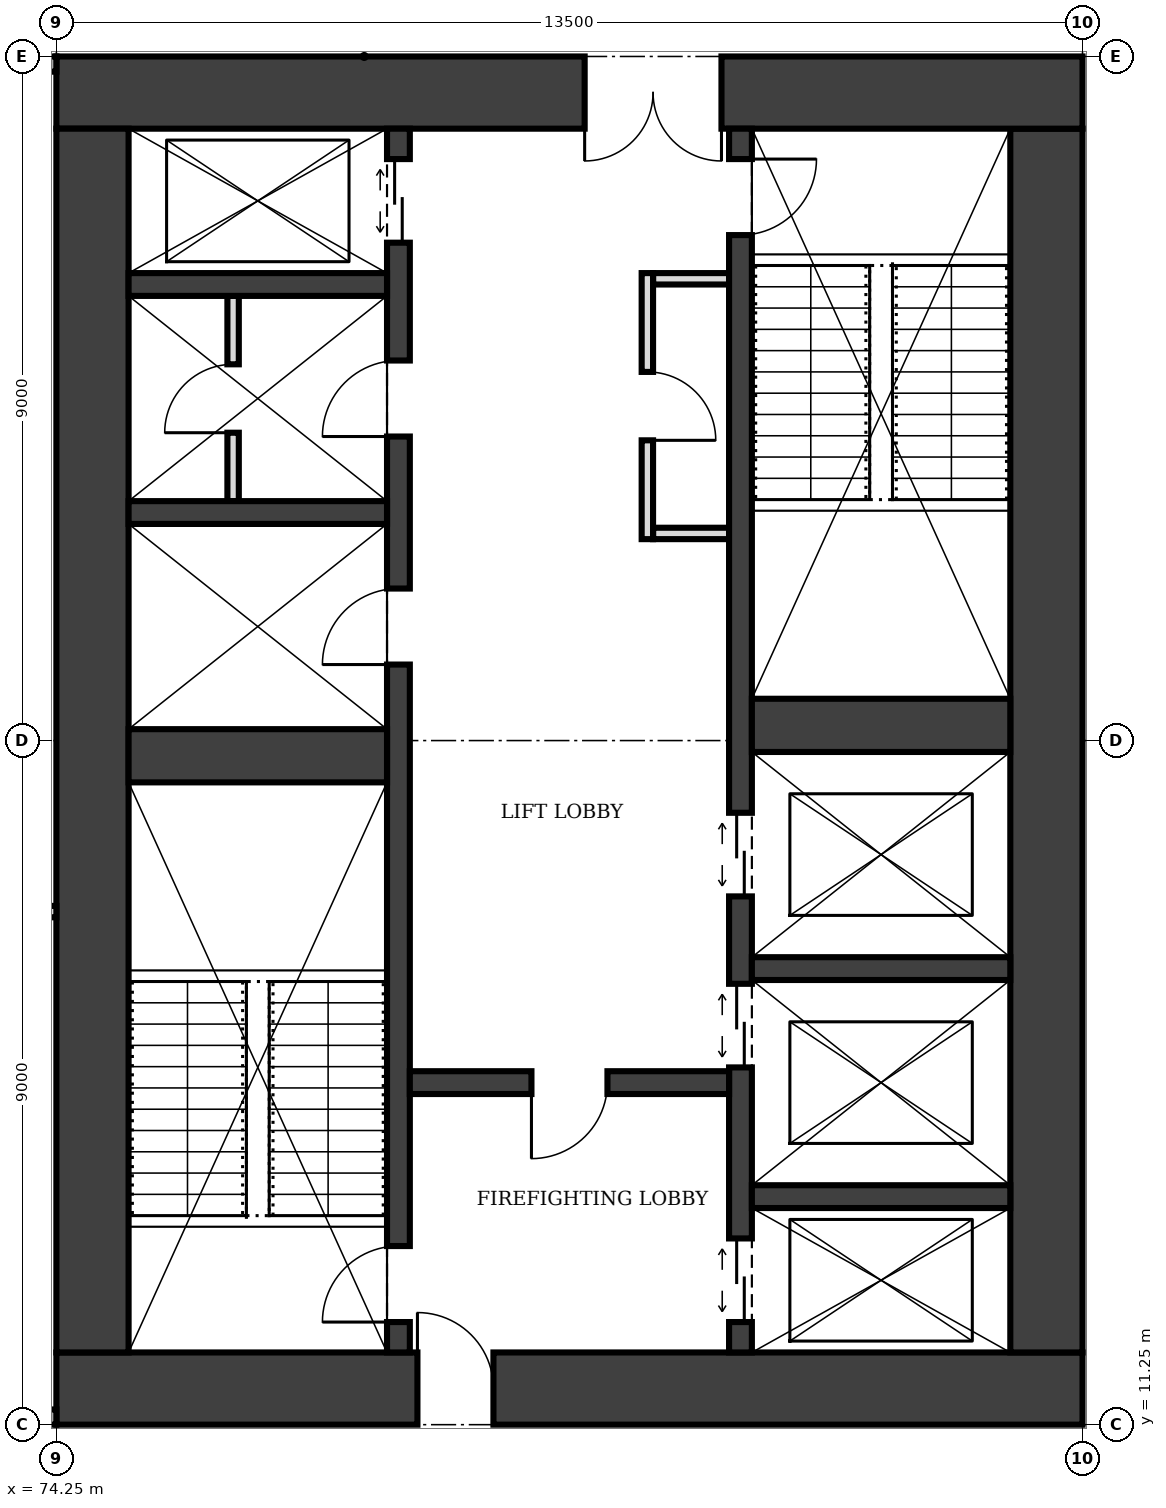
"""IFC4 building model, lengths in metres.
Left out: names, types, materials, properties, quantities, classifications, styles, units other than length and angle.
Written with IfcOpenShell. Run it as: python <this file> out.ifc"""

import sys

from ifc_helpers import new_model, si_unit, direction, frame, frame_2d, origin, place, context, subcontext, project, spatial, rectangle, extrude, element, fill, save


model = new_model("IFC4")
c1 = context("Model", 3, precision=1e-05, world=origin(), true_north=direction((0.0, 1.0)))
c2 = subcontext(c1, "Body", "Model", "MODEL_VIEW")
j1 = project(units=[si_unit("LENGTHUNIT", "METRE"), si_unit("PLANEANGLEUNIT", "RADIAN")], contexts=[c1])
p1 = place(None, origin())
s1 = spatial("IfcSite", under=j1, at=p1, CompositionType="ELEMENT")
p2 = place(p1, origin())
s2 = spatial("IfcBuilding", under=s1, at=p2, CompositionType="ELEMENT")
p3 = place(p2, frame((0.0, 0.0, 161.0)))
s3 = spatial("IfcBuildingStorey", under=s2, at=p3, CompositionType="ELEMENT", Elevation=161.0)
p4 = place(p3, frame((74.25, 11.725, 0.0), z_axis=(0.0, 0.0, 1.0), x_axis=(1.0, 0.0, 0.0)))
e1 = element("IfcWall", 1, at=p4, inside=s3, PredefinedType="SHEAR", context=c2, shape_type="SweptSolid", body=[
    extrude(rectangle(XDim=13.5, YDim=0.95, at=frame_2d((6.75, 0.0))), origin(), (0.0, 0.0, 1.0), 4.0),
])
p5 = place(p4, frame((4.75, 0.0, 0.0)))
e2 = element("IfcOpeningElement", 2, at=p5, cuts=e1, PredefinedType="OPENING", context=c2, shape_type="SweptSolid", body=[
    extrude(rectangle(XDim=1.0, YDim=2.1, at=frame_2d((0.5, 1.05))), frame((0.0, 0.485, 0.0), z_axis=(0.0, -1.0, 0.0), x_axis=(1.0, 0.0, 0.0)), (0.0, 0.0, 1.0), 0.97),
])
p6 = place(p3, frame((87.275, 12.2, 0.0), z_axis=(0.0, 0.0, 1.0), x_axis=(0.0, 1.0, 0.0)))
e3 = element("IfcWall", 3, at=p6, inside=s3, PredefinedType="SHEAR", context=c2, shape_type="SweptSolid", body=[
    extrude(rectangle(XDim=16.1, YDim=0.95, at=frame_2d((8.05, 0.0))), origin(), (0.0, 0.0, 1.0), 4.0),
])
p7 = place(p3, frame((87.75, 28.775, 0.0), z_axis=(0.0, 0.0, 1.0), x_axis=(-1.0, 0.0, 0.0)))
e4 = element("IfcWall", 4, at=p7, inside=s3, PredefinedType="SHEAR", context=c2, shape_type="SweptSolid", body=[
    extrude(rectangle(XDim=13.5, YDim=0.95, at=frame_2d((6.75, 0.0))), origin(), (0.0, 0.0, 1.0), 4.0),
])
p8 = place(p7, frame((4.75, 0.0, 0.0)))
e5 = element("IfcOpeningElement", 5, at=p8, cuts=e4, PredefinedType="OPENING", context=c2, shape_type="SweptSolid", body=[
    extrude(rectangle(XDim=1.8, YDim=2.1, at=frame_2d((0.9, 1.05))), frame((0.0, 0.485, 0.0), z_axis=(0.0, -1.0, 0.0), x_axis=(1.0, 0.0, 0.0)), (0.0, 0.0, 1.0), 0.97),
])
p9 = place(p3, frame((74.725, 28.3, 0.0), z_axis=(0.0, 0.0, 1.0), x_axis=(0.0, -1.0, 0.0)))
e6 = element("IfcWall", 6, at=p9, inside=s3, PredefinedType="SHEAR", context=c2, shape_type="SweptSolid", body=[
    extrude(rectangle(XDim=16.1, YDim=0.95, at=frame_2d((8.05, 0.0))), origin(), (0.0, 0.0, 1.0), 4.0),
])
p10 = place(p3, frame((78.75, 12.2, 0.0), z_axis=(0.0, 0.0, 1.0), x_axis=(0.0, 1.0, 0.0)))
e7 = element("IfcWall", 7, at=p10, inside=s3, PredefinedType="SHEAR", context=c2, shape_type="SweptSolid", body=[
    extrude(rectangle(XDim=16.1, YDim=0.3, at=frame_2d((8.05, 0.0))), origin(), (0.0, 0.0, 1.0), 4.0),
])
p11 = place(p10, frame((0.4, 0.0, 0.0)))
e8 = element("IfcOpeningElement", 8, at=p11, cuts=e7, PredefinedType="OPENING", context=c2, shape_type="SweptSolid", body=[
    extrude(rectangle(XDim=1.0, YDim=2.1, at=frame_2d((0.5, 1.05))), frame((0.0, 0.16, 0.0), z_axis=(0.0, -1.0, 0.0), x_axis=(1.0, 0.0, 0.0)), (0.0, 0.0, 1.0), 0.32),
])
p12 = place(p10, frame((14.6, 0.0, 0.0)))
e9 = element("IfcOpeningElement", 9, at=p12, cuts=e7, PredefinedType="OPENING", context=c2, shape_type="SweptSolid", body=[
    extrude(rectangle(XDim=1.1, YDim=2.1, at=frame_2d((0.55, 1.05))), frame((0.0, 0.16, 0.0), z_axis=(0.0, -1.0, 0.0), x_axis=(1.0, 0.0, 0.0)), (0.0, 0.0, 1.0), 0.32),
])
p13 = place(p10, frame((9.05, 0.0, 0.0)))
e10 = element("IfcOpeningElement", 10, at=p13, cuts=e7, PredefinedType="OPENING", context=c2, shape_type="SweptSolid", body=[
    extrude(rectangle(XDim=1.0, YDim=2.1, at=frame_2d((0.5, 1.05))), frame((0.0, 0.16, 0.0), z_axis=(0.0, -1.0, 0.0), x_axis=(1.0, 0.0, 0.0)), (0.0, 0.0, 1.0), 0.32),
])
p14 = place(p10, frame((12.05, 0.0, 0.0)))
e11 = element("IfcOpeningElement", 11, at=p14, cuts=e7, PredefinedType="OPENING", context=c2, shape_type="SweptSolid", body=[
    extrude(rectangle(XDim=1.0, YDim=2.1, at=frame_2d((0.5, 1.05))), frame((0.0, 0.16, 0.0), z_axis=(0.0, -1.0, 0.0), x_axis=(1.0, 0.0, 0.0)), (0.0, 0.0, 1.0), 0.32),
])
p15 = place(p3, frame((83.25, 12.2, 0.0), z_axis=(0.0, 0.0, 1.0), x_axis=(0.0, 1.0, 0.0)))
e12 = element("IfcWall", 12, at=p15, inside=s3, PredefinedType="SHEAR", context=c2, shape_type="SweptSolid", body=[
    extrude(rectangle(XDim=16.1, YDim=0.3, at=frame_2d((8.05, 0.0))), origin(), (0.0, 0.0, 1.0), 4.0),
])
p16 = place(p15, frame((14.7, 0.0, 0.0)))
e13 = element("IfcOpeningElement", 13, at=p16, cuts=e12, PredefinedType="OPENING", context=c2, shape_type="SweptSolid", body=[
    extrude(rectangle(XDim=1.0, YDim=2.1, at=frame_2d((0.5, 1.05))), frame((0.0, 0.16, 0.0), z_axis=(0.0, -1.0, 0.0), x_axis=(1.0, 0.0, 0.0)), (0.0, 0.0, 1.0), 0.32),
])
p17 = place(p15, frame((0.4, 0.0, 0.0)))
e14 = element("IfcOpeningElement", 14, at=p17, cuts=e12, PredefinedType="OPENING", context=c2, shape_type="SweptSolid", body=[
    extrude(rectangle(XDim=1.1, YDim=2.1, at=frame_2d((0.55, 1.05))), frame((0.0, 0.16, 0.0), z_axis=(0.0, -1.0, 0.0), x_axis=(1.0, 0.0, 0.0)), (0.0, 0.0, 1.0), 0.32),
])
p18 = place(p15, frame((3.75, 0.0, 0.0)))
e15 = element("IfcOpeningElement", 15, at=p18, cuts=e12, PredefinedType="OPENING", context=c2, shape_type="SweptSolid", body=[
    extrude(rectangle(XDim=1.1, YDim=2.1, at=frame_2d((0.55, 1.05))), frame((0.0, 0.16, 0.0), z_axis=(0.0, -1.0, 0.0), x_axis=(1.0, 0.0, 0.0)), (0.0, 0.0, 1.0), 0.32),
])
p19 = place(p15, frame((6.0, 0.0, 0.0)))
e16 = element("IfcOpeningElement", 16, at=p19, cuts=e12, PredefinedType="OPENING", context=c2, shape_type="SweptSolid", body=[
    extrude(rectangle(XDim=1.1, YDim=2.1, at=frame_2d((0.55, 1.05))), frame((0.0, 0.16, 0.0), z_axis=(0.0, -1.0, 0.0), x_axis=(1.0, 0.0, 0.0)), (0.0, 0.0, 1.0), 0.32),
])
p20 = place(p3, frame((75.2, 20.05, 0.0), z_axis=(0.0, 0.0, 1.0), x_axis=(1.0, 0.0, 0.0)))
e17 = element("IfcWall", 17, at=p20, inside=s3, PredefinedType="SHEAR", context=c2, shape_type="SweptSolid", body=[
    extrude(rectangle(XDim=3.4, YDim=0.7, at=frame_2d((1.7, 0.0))), origin(), (0.0, 0.0, 1.0), 4.0),
])
p21 = place(p3, frame((78.9, 15.75, 0.0), z_axis=(0.0, 0.0, 1.0), x_axis=(1.0, 0.0, 0.0)))
e18 = element("IfcWall", 18, at=p21, inside=s3, PredefinedType="SHEAR", context=c2, shape_type="SweptSolid", body=[
    extrude(rectangle(XDim=4.2, YDim=0.3, at=frame_2d((2.1, 0.0))), origin(), (0.0, 0.0, 1.0), 4.0),
])
p22 = place(p21, frame((1.6, 0.0, 0.0)))
e19 = element("IfcOpeningElement", 19, at=p22, cuts=e18, PredefinedType="OPENING", context=c2, shape_type="SweptSolid", body=[
    extrude(rectangle(XDim=1.0, YDim=2.1, at=frame_2d((0.5, 1.05))), frame((0.0, 0.16, 0.0), z_axis=(0.0, -1.0, 0.0), x_axis=(1.0, 0.0, 0.0)), (0.0, 0.0, 1.0), 0.32),
])
for number, where, z_axis, x_axis in (
    (20, (83.4, 14.25, 0.0), (0.0, 0.0, 1.0), (1.0, 0.0, 0.0)),
    (21, (83.4, 17.25, 0.0), (0.0, 0.0, 1.0), (1.0, 0.0, 0.0)),
):
    element("IfcWall", number, at=place(p3, frame(where, z_axis=z_axis, x_axis=x_axis)), inside=s3, PredefinedType="SHEAR", context=c2, shape_type="SweptSolid", body=[
        extrude(rectangle(XDim=3.4, YDim=0.3, at=frame_2d((1.7, 0.0))), origin(), (0.0, 0.0, 1.0), 4.0),
    ])
p23 = place(p3, frame((83.4, 20.45, 0.0), z_axis=(0.0, 0.0, 1.0), x_axis=(1.0, 0.0, 0.0)))
e22 = element("IfcWall", 22, at=p23, inside=s3, PredefinedType="SHEAR", context=c2, shape_type="SweptSolid", body=[
    extrude(rectangle(XDim=3.4, YDim=0.7, at=frame_2d((1.7, 0.0))), origin(), (0.0, 0.0, 1.0), 4.0),
])
for number, where, z_axis, x_axis in (
    (23, (75.2, 23.25, 0.0), (0.0, 0.0, 1.0), (1.0, 0.0, 0.0)),
    (24, (75.2, 26.25, 0.0), (0.0, 0.0, 1.0), (1.0, 0.0, 0.0)),
):
    element("IfcWall", number, at=place(p3, frame(where, z_axis=z_axis, x_axis=x_axis)), inside=s3, PredefinedType="SHEAR", context=c2, shape_type="SweptSolid", body=[
        extrude(rectangle(XDim=3.4, YDim=0.3, at=frame_2d((1.7, 0.0))), origin(), (0.0, 0.0, 1.0), 4.0),
    ])
p24 = place(p3, frame((82.025, 22.9, 0.0), z_axis=(0.0, 0.0, 1.0), x_axis=(0.0, 1.0, 0.0)))
e25 = element("IfcWall", 25, at=p24, inside=s3, PredefinedType="PARTITIONING", context=c2, shape_type="SweptSolid", body=[
    extrude(rectangle(XDim=3.5, YDim=0.15, at=frame_2d((1.75, 0.0))), origin(), (0.0, 0.0, 1.0), 3.75),
])
p25 = place(p24, frame((1.3, 0.0, 0.0)))
e26 = element("IfcOpeningElement", 26, at=p25, cuts=e25, PredefinedType="OPENING", context=c2, shape_type="SweptSolid", body=[
    extrude(rectangle(XDim=0.9, YDim=2.1, at=frame_2d((0.45, 1.05))), frame((0.0, 0.085, 0.0), z_axis=(0.0, -1.0, 0.0), x_axis=(1.0, 0.0, 0.0)), (0.0, 0.0, 1.0), 0.17),
])
for number, where, z_axis, x_axis in (
    (27, (82.1, 22.975, 0.0), (0.0, 0.0, 1.0), (1.0, 0.0, 0.0)),
    (28, (82.1, 26.325, 0.0), (0.0, 0.0, 1.0), (1.0, 0.0, 0.0)),
):
    element("IfcWall", number, at=place(p3, frame(where, z_axis=z_axis, x_axis=x_axis)), inside=s3, PredefinedType="PARTITIONING", context=c2, shape_type="SweptSolid", body=[
        extrude(rectangle(XDim=1.0, YDim=0.15, at=frame_2d((0.5, 0.0))), origin(), (0.0, 0.0, 1.0), 3.75),
    ])
p26 = place(p3, frame((76.575, 23.4, 0.0), z_axis=(0.0, 0.0, 1.0), x_axis=(0.0, 1.0, 0.0)))
e29 = element("IfcWall", 29, at=p26, inside=s3, PredefinedType="PARTITIONING", context=c2, shape_type="SweptSolid", body=[
    extrude(rectangle(XDim=2.7, YDim=0.15, at=frame_2d((1.35, 0.0))), origin(), (0.0, 0.0, 1.0), 3.75),
])
p27 = place(p26, frame((0.9, 0.0, 0.0)))
e30 = element("IfcOpeningElement", 30, at=p27, cuts=e29, PredefinedType="OPENING", context=c2, shape_type="SweptSolid", body=[
    extrude(rectangle(XDim=0.9, YDim=2.1, at=frame_2d((0.45, 1.05))), frame((0.0, 0.085, 0.0), z_axis=(0.0, -1.0, 0.0), x_axis=(1.0, 0.0, 0.0)), (0.0, 0.0, 1.0), 0.17),
])
for number, where, z_axis, x_axis in (
    (31, (68.47, 11.35, 0.0), (0.0, 0.0, 1.0), (1.0, 0.0, 0.0)),
    (32, (68.47, 29.15, 0.0), (0.0, 0.0, 1.0), (1.0, 0.0, 0.0)),
):
    element("IfcWall", number, at=place(p3, frame(where, z_axis=z_axis, x_axis=x_axis)), inside=s3, PredefinedType="SOLIDWALL", context=c2, shape_type="SweptSolid", body=[
        extrude(rectangle(XDim=5.78, YDim=0.2, at=frame_2d((2.89, 0.0))), origin(), (0.0, 0.0, 1.0), 2.85),
    ])
p28 = place(p3, frame((65.15, 18.0, 0.0), z_axis=(0.0, 0.0, 1.0), x_axis=(1.0, 0.0, 0.0)))
e33 = element("IfcWall", 33, at=p28, inside=s3, PredefinedType="PARTITIONING", context=c2, shape_type="SweptSolid", body=[
    extrude(rectangle(XDim=9.1, YDim=0.15, at=frame_2d((4.55, 0.0))), origin(), (0.0, 0.0, 1.0), 3.75),
])
p29 = place(p5, origin())
e34 = element("IfcDoor", 34, at=p29, inside=s3, OperationType="SINGLE_SWING_LEFT", PredefinedType="DOOR", context=c2, shape_type="SweptSolid", body=[
    extrude(rectangle(XDim=1.0, YDim=2.1, at=frame_2d((0.5, 1.05))), frame((0.0, 0.025, 0.0), z_axis=(0.0, -1.0, 0.0), x_axis=(1.0, 0.0, 0.0)), (0.0, 0.0, 1.0), 0.05),
])
fill(e2, e34)
p30 = place(p8, origin())
e35 = element("IfcDoor", 35, at=p30, inside=s3, OperationType="DOUBLE_DOOR_SINGLE_SWING", PredefinedType="DOOR", context=c2, shape_type="SweptSolid", body=[
    extrude(rectangle(XDim=1.8, YDim=2.1, at=frame_2d((0.9, 1.05))), frame((0.0, 0.025, 0.0), z_axis=(0.0, -1.0, 0.0), x_axis=(1.0, 0.0, 0.0)), (0.0, 0.0, 1.0), 0.05),
])
fill(e5, e35)
p31 = place(p22, frame((1.0, 0.0, 0.0), z_axis=(0.0, 0.0, 1.0), x_axis=(-1.0, 0.0, 0.0)))
e36 = element("IfcDoor", 36, at=p31, inside=s3, OperationType="SINGLE_SWING_RIGHT", PredefinedType="DOOR", context=c2, shape_type="SweptSolid", body=[
    extrude(rectangle(XDim=1.0, YDim=2.1, at=frame_2d((0.5, 1.05))), frame((0.0, 0.025, 0.0), z_axis=(0.0, -1.0, 0.0), x_axis=(1.0, 0.0, 0.0)), (0.0, 0.0, 1.0), 0.05),
])
fill(e19, e36)
p32 = place(p11, origin())
e37 = element("IfcDoor", 37, at=p32, inside=s3, OperationType="SINGLE_SWING_LEFT", PredefinedType="DOOR", context=c2, shape_type="SweptSolid", body=[
    extrude(rectangle(XDim=1.0, YDim=2.1, at=frame_2d((0.5, 1.05))), frame((0.0, 0.025, 0.0), z_axis=(0.0, -1.0, 0.0), x_axis=(1.0, 0.0, 0.0)), (0.0, 0.0, 1.0), 0.05),
])
fill(e8, e37)
p33 = place(p16, frame((1.0, 0.0, 0.0), z_axis=(0.0, 0.0, 1.0), x_axis=(-1.0, 0.0, 0.0)))
e38 = element("IfcDoor", 38, at=p33, inside=s3, OperationType="SINGLE_SWING_LEFT", PredefinedType="DOOR", context=c2, shape_type="SweptSolid", body=[
    extrude(rectangle(XDim=1.0, YDim=2.1, at=frame_2d((0.5, 1.05))), frame((0.0, 0.025, 0.0), z_axis=(0.0, -1.0, 0.0), x_axis=(1.0, 0.0, 0.0)), (0.0, 0.0, 1.0), 0.05),
])
fill(e13, e38)
p34 = place(p17, origin())
e39 = element("IfcDoor", 39, at=p34, inside=s3, OperationType="DOUBLE_DOOR_SLIDING", PredefinedType="DOOR", context=c2, shape_type="SweptSolid", body=[
    extrude(rectangle(XDim=1.1, YDim=2.1, at=frame_2d((0.55, 1.05))), frame((0.0, 0.025, 0.0), z_axis=(0.0, -1.0, 0.0), x_axis=(1.0, 0.0, 0.0)), (0.0, 0.0, 1.0), 0.05),
])
fill(e14, e39)
p35 = place(p12, origin())
e40 = element("IfcDoor", 40, at=p35, inside=s3, OperationType="DOUBLE_DOOR_SLIDING", PredefinedType="DOOR", context=c2, shape_type="SweptSolid", body=[
    extrude(rectangle(XDim=1.1, YDim=2.1, at=frame_2d((0.55, 1.05))), frame((0.0, 0.025, 0.0), z_axis=(0.0, -1.0, 0.0), x_axis=(1.0, 0.0, 0.0)), (0.0, 0.0, 1.0), 0.05),
])
fill(e9, e40)
p36 = place(p18, origin())
e41 = element("IfcDoor", 41, at=p36, inside=s3, OperationType="DOUBLE_DOOR_SLIDING", PredefinedType="DOOR", context=c2, shape_type="SweptSolid", body=[
    extrude(rectangle(XDim=1.1, YDim=2.1, at=frame_2d((0.55, 1.05))), frame((0.0, 0.025, 0.0), z_axis=(0.0, -1.0, 0.0), x_axis=(1.0, 0.0, 0.0)), (0.0, 0.0, 1.0), 0.05),
])
fill(e15, e41)
p37 = place(p19, origin())
e42 = element("IfcDoor", 42, at=p37, inside=s3, OperationType="DOUBLE_DOOR_SLIDING", PredefinedType="DOOR", context=c2, shape_type="SweptSolid", body=[
    extrude(rectangle(XDim=1.1, YDim=2.1, at=frame_2d((0.55, 1.05))), frame((0.0, 0.025, 0.0), z_axis=(0.0, -1.0, 0.0), x_axis=(1.0, 0.0, 0.0)), (0.0, 0.0, 1.0), 0.05),
])
fill(e16, e42)
p38 = place(p25, frame((0.9, 0.0, 0.0), z_axis=(0.0, 0.0, 1.0), x_axis=(-1.0, 0.0, 0.0)))
e43 = element("IfcDoor", 43, at=p38, inside=s3, OperationType="SINGLE_SWING_RIGHT", PredefinedType="DOOR", context=c2, shape_type="SweptSolid", body=[
    extrude(rectangle(XDim=0.9, YDim=2.1, at=frame_2d((0.45, 1.05))), frame((0.0, 0.025, 0.0), z_axis=(0.0, -1.0, 0.0), x_axis=(1.0, 0.0, 0.0)), (0.0, 0.0, 1.0), 0.05),
])
fill(e26, e43)
p39 = place(p13, origin())
e44 = element("IfcDoor", 44, at=p39, inside=s3, OperationType="SINGLE_SWING_LEFT", PredefinedType="DOOR", context=c2, shape_type="SweptSolid", body=[
    extrude(rectangle(XDim=1.0, YDim=2.1, at=frame_2d((0.5, 1.05))), frame((0.0, 0.025, 0.0), z_axis=(0.0, -1.0, 0.0), x_axis=(1.0, 0.0, 0.0)), (0.0, 0.0, 1.0), 0.05),
])
fill(e10, e44)
p40 = place(p14, origin())
e45 = element("IfcDoor", 45, at=p40, inside=s3, OperationType="SINGLE_SWING_LEFT", PredefinedType="DOOR", context=c2, shape_type="SweptSolid", body=[
    extrude(rectangle(XDim=1.0, YDim=2.1, at=frame_2d((0.5, 1.05))), frame((0.0, 0.025, 0.0), z_axis=(0.0, -1.0, 0.0), x_axis=(1.0, 0.0, 0.0)), (0.0, 0.0, 1.0), 0.05),
])
fill(e11, e45)
p41 = place(p27, origin())
e46 = element("IfcDoor", 46, at=p41, inside=s3, OperationType="SINGLE_SWING_LEFT", PredefinedType="DOOR", context=c2, shape_type="SweptSolid", body=[
    extrude(rectangle(XDim=0.9, YDim=2.1, at=frame_2d((0.45, 1.05))), frame((0.0, 0.025, 0.0), z_axis=(0.0, -1.0, 0.0), x_axis=(1.0, 0.0, 0.0)), (0.0, 0.0, 1.0), 0.05),
])
fill(e30, e46)
save(model, sys.argv[1])
